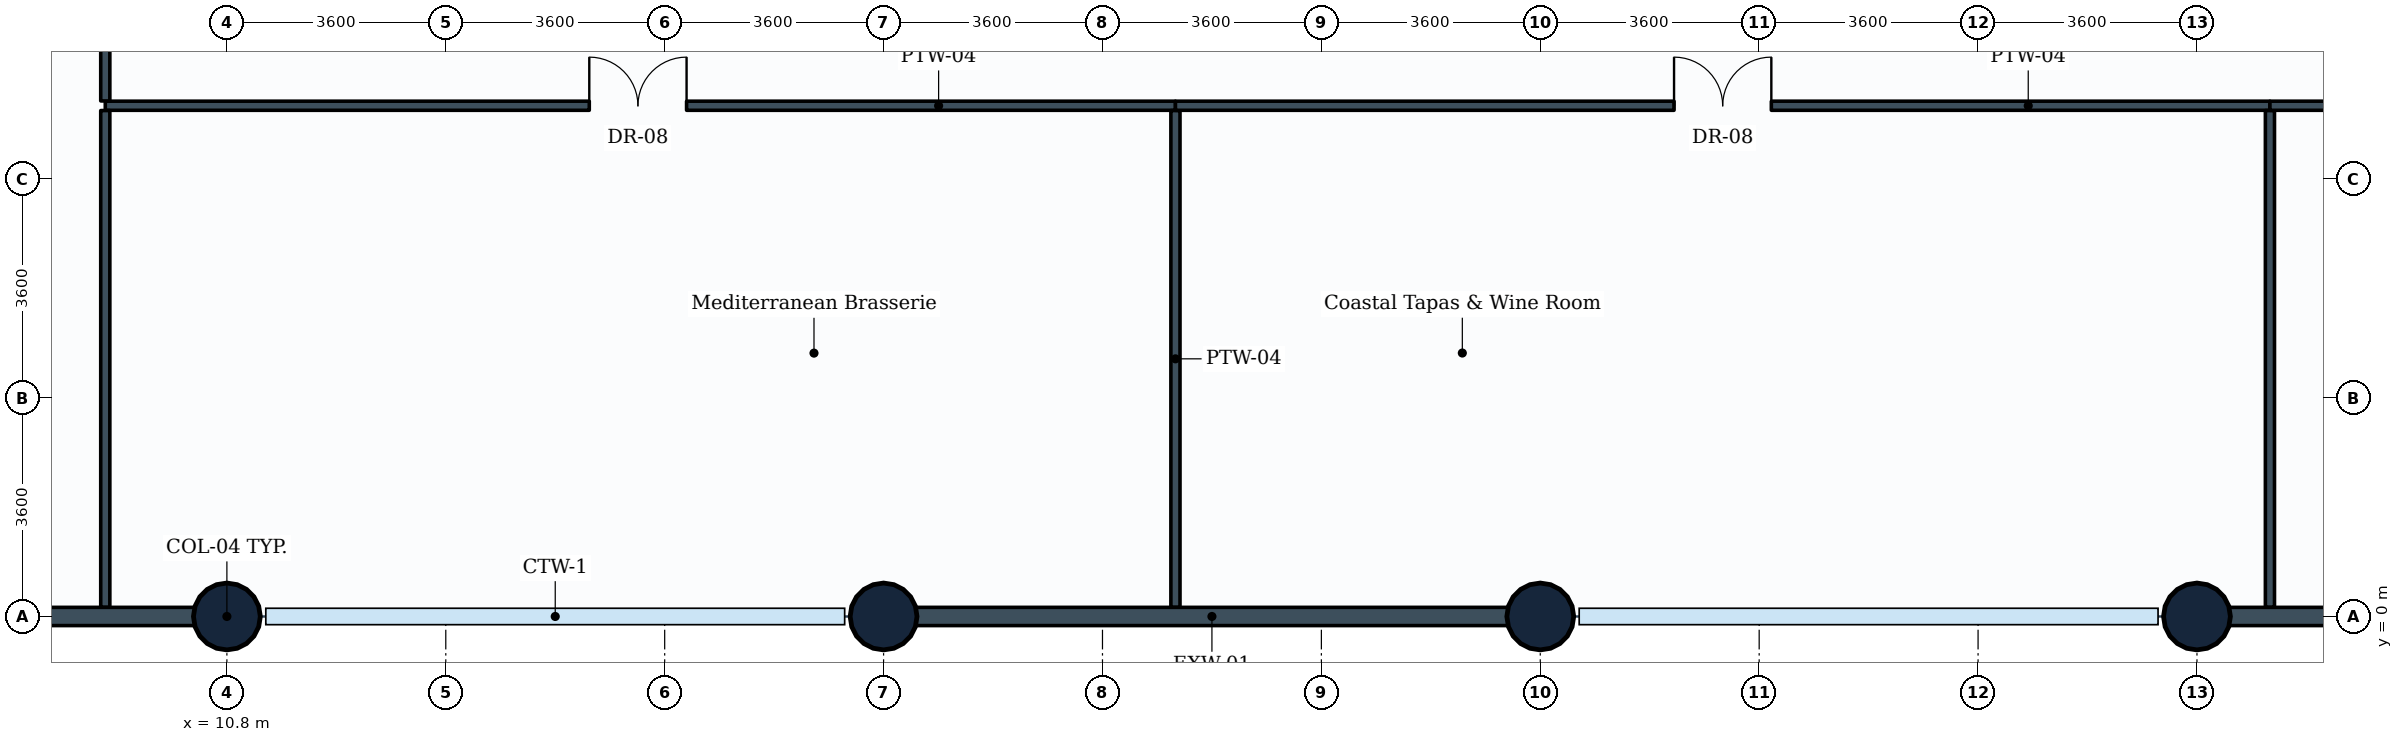
"""IFC4 building model, lengths in metres.
Left out: names, types, materials, properties, quantities, classifications, styles, units other than length and angle.
Written with IfcOpenShell. Run it as: python <this file> out.ifc"""

import sys

from ifc_helpers import new_model, si_unit, direction, frame, frame_2d, origin, origin_2d, place, context, subcontext, project, spatial, rectangle, circle, extrude, element, fill, save


model = new_model("IFC4")
c1 = context("Model", 3, precision=1e-05, world=origin(), true_north=direction((0.0, 1.0)))
c2 = subcontext(c1, "Body", "Model", "MODEL_VIEW")
j1 = project(units=[si_unit("LENGTHUNIT", "METRE"), si_unit("PLANEANGLEUNIT", "RADIAN")], contexts=[c1])
p1 = place(None, origin())
s1 = spatial("IfcSite", under=j1, at=p1, CompositionType="ELEMENT")
p2 = place(p1, origin())
s2 = spatial("IfcBuilding", under=s1, at=p2, CompositionType="ELEMENT")
p3 = place(p2, frame((0.0, 0.0, 10.2)))
s3 = spatial("IfcBuildingStorey", under=s2, at=p3, CompositionType="ELEMENT", Elevation=10.2)
for number, where, z_axis, x_axis in (
    (1, (10.8, 0.0, 0.0), (0.0, 0.0, 1.0), (1.0, 0.0, 0.0)),
    (2, (21.6, 0.0, 0.0), (0.0, 0.0, 1.0), (1.0, 0.0, 0.0)),
    (3, (32.4, 0.0, 0.0), (0.0, 0.0, 1.0), (1.0, 0.0, 0.0)),
    (4, (43.2, 0.0, 0.0), (0.0, 0.0, 1.0), (1.0, 0.0, 0.0)),
):
    element("IfcColumn", number, at=place(p3, frame(where, z_axis=z_axis, x_axis=x_axis)), inside=s3, PredefinedType="COLUMN", context=c2, shape_type="SweptSolid", body=[
        extrude(circle(Radius=0.55, at=origin_2d()), origin(), (0.0, 0.0, 1.0), 4.6),
    ])
p4 = place(p3, frame((10.8, 0.0, 0.0), z_axis=(0.0, 0.0, 1.0), x_axis=(-1.0, 0.0, 0.0)))
e5 = element("IfcWall", 5, at=p4, inside=s3, PredefinedType="STANDARD", context=c2, shape_type="SweptSolid", body=[
    extrude(rectangle(XDim=10.8, YDim=0.3, at=frame_2d((5.4, 0.0))), origin(), (0.0, 0.0, 1.0), 3.23),
])
p5 = place(p4, frame((4.1, 0.0, 0.85)))
e6 = element("IfcOpeningElement", 6, at=p5, cuts=e5, PredefinedType="OPENING", context=c2, shape_type="SweptSolid", body=[
    extrude(rectangle(XDim=2.4, YDim=1.6, at=frame_2d((1.2, 0.8))), frame((0.0, 0.16, 0.0), z_axis=(0.0, -1.0, 0.0), x_axis=(1.0, 0.0, 0.0)), (0.0, 0.0, 1.0), 0.32),
])
p6 = place(p3, frame((32.4, 0.0, 0.0), z_axis=(0.0, 0.0, 1.0), x_axis=(-1.0, 0.0, 0.0)))
e7 = element("IfcWall", 7, at=p6, inside=s3, PredefinedType="STANDARD", context=c2, shape_type="SweptSolid", body=[
    extrude(rectangle(XDim=10.8, YDim=0.3, at=frame_2d((5.4, 0.0))), origin(), (0.0, 0.0, 1.0), 3.23),
])
p7 = place(p3, frame((54.0, 0.0, 0.0), z_axis=(0.0, 0.0, 1.0), x_axis=(-1.0, 0.0, 0.0)))
e8 = element("IfcWall", 8, at=p7, inside=s3, PredefinedType="STANDARD", context=c2, shape_type="SweptSolid", body=[
    extrude(rectangle(XDim=10.8, YDim=0.3, at=frame_2d((5.4, 0.0))), origin(), (0.0, 0.0, 1.0), 3.23),
])
p8 = place(p7, frame((4.2, 0.0, 0.85)))
e9 = element("IfcOpeningElement", 9, at=p8, cuts=e8, PredefinedType="OPENING", context=c2, shape_type="SweptSolid", body=[
    extrude(rectangle(XDim=2.4, YDim=1.6, at=frame_2d((1.2, 0.8))), frame((0.0, 0.16, 0.0), z_axis=(0.0, -1.0, 0.0), x_axis=(1.0, 0.0, 0.0)), (0.0, 0.0, 1.0), 0.32),
])
p9 = place(p3, frame((8.8, 8.4, 0.0), z_axis=(0.0, 0.0, 1.0), x_axis=(1.0, 0.0, 0.0)))
e10 = element("IfcWall", 10, at=p9, inside=s3, PredefinedType="PARTITIONING", context=c2, shape_type="SweptSolid", body=[
    extrude(rectangle(XDim=17.6, YDim=0.15, at=frame_2d((8.8, 0.0))), origin(), (0.0, 0.0, 1.0), 3.23),
])
p10 = place(p9, frame((7.96, 0.0, 0.0)))
e11 = element("IfcOpeningElement", 11, at=p10, cuts=e10, PredefinedType="OPENING", context=c2, shape_type="SweptSolid", body=[
    extrude(rectangle(XDim=1.6, YDim=2.2, at=frame_2d((0.8, 1.1))), frame((0.0, 0.085, 0.0), z_axis=(0.0, -1.0, 0.0), x_axis=(1.0, 0.0, 0.0)), (0.0, 0.0, 1.0), 0.17),
])
p11 = place(p3, frame((26.4, 0.154, 0.0), z_axis=(0.0, 0.0, 1.0), x_axis=(0.0, 1.0, 0.0)))
e12 = element("IfcWall", 12, at=p11, inside=s3, PredefinedType="PARTITIONING", context=c2, shape_type="SweptSolid", body=[
    extrude(rectangle(XDim=8.167, YDim=0.15, at=frame_2d((4.083, 0.0))), origin(), (0.0, 0.0, 1.0), 4.285),
])
p12 = place(p3, frame((26.4, 8.4, 0.0), z_axis=(0.0, 0.0, 1.0), x_axis=(1.0, 0.0, 0.0)))
e13 = element("IfcWall", 13, at=p12, inside=s3, PredefinedType="PARTITIONING", context=c2, shape_type="SweptSolid", body=[
    extrude(rectangle(XDim=18.0, YDim=0.15, at=frame_2d((9.0, 0.0))), origin(), (0.0, 0.0, 1.0), 3.23),
])
p13 = place(p12, frame((8.2, 0.0, 0.0)))
e14 = element("IfcOpeningElement", 14, at=p13, cuts=e13, PredefinedType="OPENING", context=c2, shape_type="SweptSolid", body=[
    extrude(rectangle(XDim=1.6, YDim=2.2, at=frame_2d((0.8, 1.1))), frame((0.0, 0.085, 0.0), z_axis=(0.0, -1.0, 0.0), x_axis=(1.0, 0.0, 0.0)), (0.0, 0.0, 1.0), 0.17),
])
p14 = place(p3, frame((44.4, 0.154, 0.0), z_axis=(0.0, 0.0, 1.0), x_axis=(0.0, 1.0, 0.0)))
e15 = element("IfcWall", 15, at=p14, inside=s3, PredefinedType="PARTITIONING", context=c2, shape_type="SweptSolid", body=[
    extrude(rectangle(XDim=8.167, YDim=0.15, at=frame_2d((4.083, 0.0))), origin(), (0.0, 0.0, 1.0), 4.285),
])
p15 = place(p3, frame((44.4, 8.4, 0.0), z_axis=(0.0, 0.0, 1.0), x_axis=(1.0, 0.0, 0.0)))
e16 = element("IfcWall", 16, at=p15, inside=s3, PredefinedType="PARTITIONING", context=c2, shape_type="SweptSolid", body=[
    extrude(rectangle(XDim=18.8, YDim=0.15, at=frame_2d((9.4, 0.0))), origin(), (0.0, 0.0, 1.0), 3.23),
])
p16 = place(p15, frame((5.807, 0.0, 0.0)))
e17 = element("IfcOpeningElement", 17, at=p16, cuts=e16, PredefinedType="OPENING", context=c2, shape_type="SweptSolid", body=[
    extrude(rectangle(XDim=1.6, YDim=2.2, at=frame_2d((0.8, 1.1))), frame((0.0, 0.085, 0.0), z_axis=(0.0, -1.0, 0.0), x_axis=(1.0, 0.0, 0.0)), (0.0, 0.0, 1.0), 0.17),
])
p17 = place(p3, frame((8.8, 0.154, 0.0), z_axis=(0.0, 0.0, 1.0), x_axis=(0.0, 1.0, 0.0)))
e18 = element("IfcWall", 18, at=p17, inside=s3, PredefinedType="PARTITIONING", context=c2, shape_type="SweptSolid", body=[
    extrude(rectangle(XDim=8.167, YDim=0.15, at=frame_2d((4.083, 0.0))), origin(), (0.0, 0.0, 1.0), 4.285),
])
p18 = place(p3, frame((8.8, 8.479, 0.0), z_axis=(0.0, 0.0, 1.0), x_axis=(0.0, 1.0, 0.0)))
e19 = element("IfcWall", 19, at=p18, inside=s3, PredefinedType="PARTITIONING", context=c2, shape_type="SweptSolid", body=[
    extrude(rectangle(XDim=10.721, YDim=0.15, at=frame_2d((5.36, 0.0))), origin(), (0.0, 0.0, 1.0), 3.63),
])
p19 = place(p18, frame((5.101, 0.0, 0.0)))
e20 = element("IfcOpeningElement", 20, at=p19, cuts=e19, PredefinedType="OPENING", context=c2, shape_type="SweptSolid", body=[
    extrude(rectangle(XDim=1.0, YDim=2.1, at=frame_2d((0.5, 1.05))), frame((0.0, 0.085, 0.0), z_axis=(0.0, -1.0, 0.0), x_axis=(1.0, 0.0, 0.0)), (0.0, 0.0, 1.0), 0.17),
])
p20 = place(p10, origin())
e21 = element("IfcDoor", 21, at=p20, inside=s3, OperationType="DOUBLE_DOOR_SINGLE_SWING", PredefinedType="DOOR", context=c2, shape_type="SweptSolid", body=[
    extrude(rectangle(XDim=1.6, YDim=2.2, at=frame_2d((0.8, 1.1))), frame((0.0, 0.025, 0.0), z_axis=(0.0, -1.0, 0.0), x_axis=(1.0, 0.0, 0.0)), (0.0, 0.0, 1.0), 0.05),
])
fill(e11, e21)
p21 = place(p13, origin())
e22 = element("IfcDoor", 22, at=p21, inside=s3, OperationType="DOUBLE_DOOR_SINGLE_SWING", PredefinedType="DOOR", context=c2, shape_type="SweptSolid", body=[
    extrude(rectangle(XDim=1.6, YDim=2.2, at=frame_2d((0.8, 1.1))), frame((0.0, 0.025, 0.0), z_axis=(0.0, -1.0, 0.0), x_axis=(1.0, 0.0, 0.0)), (0.0, 0.0, 1.0), 0.05),
])
fill(e14, e22)
save(model, sys.argv[1])
